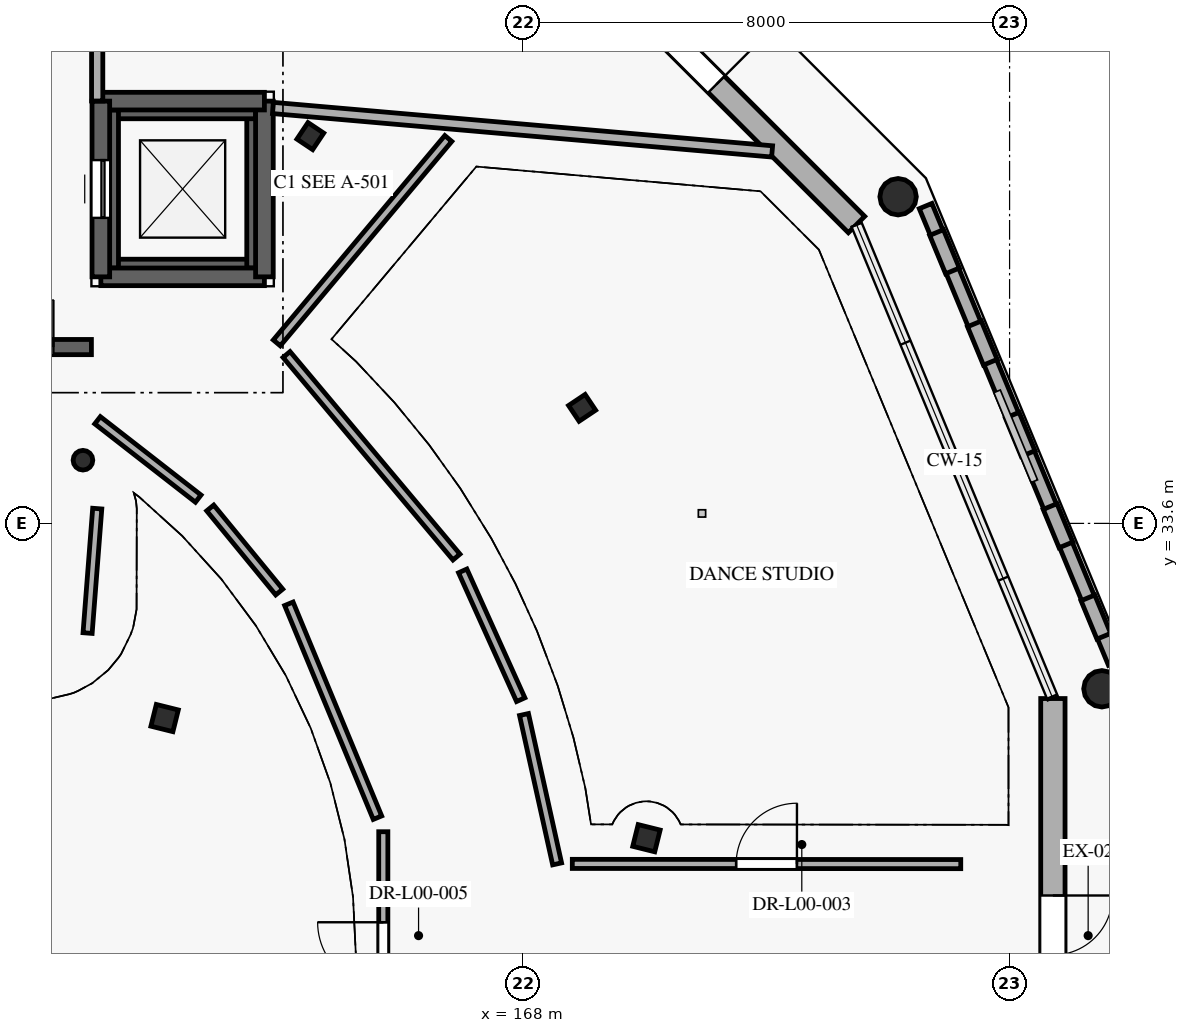
"""IFC4 building model, lengths in metres.
Left out: names, types, materials, properties, quantities, classifications, styles, units other than length and angle.
Written with IfcOpenShell. Run it as: python <this file> out.ifc"""

import sys

from ifc_helpers import new_model, si_unit, direction, frame, frame_2d, origin, origin_2d, place, context, subcontext, project, spatial, rectangle, circle, hollow_circle, i_section, extrude, element, fill, save


model = new_model("IFC4")
c1 = context("Model", 3, precision=1e-05, world=origin(), true_north=direction((0.0, 1.0)))
c2 = subcontext(c1, "Body", "Model", "MODEL_VIEW")
j1 = project(units=[si_unit("LENGTHUNIT", "METRE"), si_unit("PLANEANGLEUNIT", "RADIAN")], contexts=[c1])
p1 = place(None, origin())
s1 = spatial("IfcSite", under=j1, at=p1, CompositionType="ELEMENT")
p2 = place(p1, origin())
s2 = spatial("IfcBuilding", under=s1, at=p2, CompositionType="ELEMENT")
p3 = place(p2, origin())
s3 = spatial("IfcBuildingStorey", under=s2, at=p3, CompositionType="ELEMENT", Elevation=0.0)
for number, where, z_axis, x_axis in (
    (1, (162.104, 30.398, 0.0), (0.0, 0.0, 1.0), (0.97, -0.242, 0.0)),
    (2, (170.028, 28.423, 0.0), (0.0, 0.0, 1.0), (0.97, -0.242, 0.0)),
):
    element("IfcColumn", number, at=place(p3, frame(where, z_axis=z_axis, x_axis=x_axis)), inside=s3, PredefinedType="COLUMN", context=c2, shape_type="SweptSolid", body=[
        extrude(i_section(OverallWidth=0.373, OverallDepth=0.368, WebThickness=0.014, FlangeThickness=0.024, FilletRadius=0.015, at=origin_2d()), origin(), (0.0, 0.0, 1.0), 4.2),
    ])
p4 = place(p3, frame((160.761, 34.639, 0.0), z_axis=(0.0, 0.0, 1.0), x_axis=(0.707106781187, 0.707106781187, 0.0)))
e3 = element("IfcColumn", 3, at=p4, inside=s3, PredefinedType="COLUMN", context=c2, shape_type="SweptSolid", body=[
    extrude(hollow_circle(Radius=0.162, WallThickness=0.016, at=origin_2d()), origin(), (0.0, 0.0, 1.0), 4.2),
])
for number, where, z_axis, x_axis in (
    (4, (177.519, 30.88, 0.0), (0.0, 0.0, 1.0), (-0.195, 0.981, 0.0)),
    (5, (174.167, 38.973, 0.0), (0.0, 0.0, 1.0), (-0.556, 0.831, 0.0)),
):
    element("IfcColumn", number, at=place(p3, frame(where, z_axis=z_axis, x_axis=x_axis)), inside=s3, PredefinedType="COLUMN", context=c2, shape_type="SweptSolid", body=[
        extrude(circle(Radius=0.3, at=origin_2d()), origin(), (0.0, 0.0, 1.0), 4.2),
    ])
for number, where, z_axis, x_axis in (
    (6, (168.97, 35.5, 0.0), (0.0, 0.0, 1.0), (-0.556, 0.831, 0.0)),
    (7, (164.5, 39.97, 0.0), (0.0, 0.0, 1.0), (-0.831, 0.556, 0.0)),
):
    element("IfcColumn", number, at=place(p3, frame(where, z_axis=z_axis, x_axis=x_axis)), inside=s3, PredefinedType="COLUMN", context=c2, shape_type="SweptSolid", body=[
        extrude(i_section(OverallWidth=0.311, OverallDepth=0.327, WebThickness=0.016, FlangeThickness=0.025, FilletRadius=0.015, at=origin_2d()), origin(), (0.0, 0.0, 1.0), 4.2),
    ])
p5 = place(p3, frame((167.516, 44.483, 0.0), z_axis=(0.0, 0.0, 1.0), x_axis=(0.707106781187, -0.707106781187, 0.0)))
e8 = element("IfcWall", 8, at=p5, inside=s3, PredefinedType="SOLIDWALL", context=c2, shape_type="SweptSolid", body=[
    extrude(rectangle(XDim=8.439, YDim=0.38, at=frame_2d((4.219, 0.0))), origin(), (0.0, 0.0, 1.0), 3.94),
])
p6 = place(p5, frame((3.26, 0.0, 0.0)))
e9 = element("IfcOpeningElement", 9, at=p6, cuts=e8, PredefinedType="OPENING", context=c2, shape_type="SweptSolid", body=[
    extrude(rectangle(XDim=1.92, YDim=2.18, at=frame_2d((0.96, 1.09))), frame((0.0, 0.2, 0.0), z_axis=(0.0, -1.0, 0.0), x_axis=(1.0, 0.0, 0.0)), (0.0, 0.0, 1.0), 0.4),
])
p7 = place(p3, frame((176.712, 30.719, 0.0), z_axis=(0.0, 0.0, 1.0), x_axis=(0.0, -1.0, 0.0)))
e10 = element("IfcWall", 10, at=p7, inside=s3, PredefinedType="SOLIDWALL", context=c2, shape_type="SweptSolid", body=[
    extrude(rectangle(XDim=8.438, YDim=0.4, at=frame_2d((4.219, 0.0))), origin(), (0.0, 0.0, 1.0), 3.94),
])
p8 = place(p7, frame((3.239, 0.0, 0.0)))
e11 = element("IfcOpeningElement", 11, at=p8, cuts=e10, PredefinedType="OPENING", context=c2, shape_type="SweptSolid", body=[
    extrude(rectangle(XDim=1.96, YDim=2.2, at=frame_2d((0.98, 1.1))), frame((0.0, 0.21, 0.0), z_axis=(0.0, -1.0, 0.0), x_axis=(1.0, 0.0, 0.0)), (0.0, 0.0, 1.0), 0.42),
])
p9 = place(p3, frame((177.73, 31.308, 0.0), z_axis=(0.0, 0.0, 1.0), x_axis=(-0.382701881142, 0.923871890562, 0.0)))
e12 = element("IfcWall", 12, at=p9, inside=s3, PredefinedType="ELEMENTEDWALL", context=c2, shape_type="SweptSolid", body=[
    extrude(rectangle(XDim=8.13, YDim=0.225, at=frame_2d((4.065, 0.0))), origin(), (0.0, 0.0, 1.0), 0.55),
])
for number, where, z_axis, x_axis in (
    (13, (177.55, 31.744, 0.55), (0.0, 0.0, 1.0), (-0.383, 0.924, 0.0)),
    (14, (176.927, 33.246, 0.55), (0.0, 0.0, 1.0), (-0.382, 0.924, 0.0)),
    (15, (176.305, 34.748, 0.55), (0.0, 0.0, 1.0), (-0.383, 0.924, 0.0)),
    (16, (175.683, 36.25, 0.55), (0.0, 0.0, 1.0), (-0.383, 0.924, 0.0)),
    (17, (175.061, 37.753, 0.55), (0.0, 0.0, 1.0), (-0.383, 0.924, 0.0)),
):
    element("IfcWall", number, at=place(p3, frame(where, z_axis=z_axis, x_axis=x_axis)), inside=s3, PredefinedType="ELEMENTEDWALL", context=c2, shape_type="SweptSolid", body=[
        extrude(rectangle(XDim=0.683, YDim=0.245, at=frame_2d((0.342, 0.0))), origin(), (0.0, 0.0, 1.0), 3.39),
    ])
p10 = place(p3, frame((161.2, 37.8, -1.4), z_axis=(0.0, 0.0, 1.0), x_axis=(1.0, 0.0, 0.0)))
e18 = element("IfcWall", 18, at=p10, inside=s3, PredefinedType="SHEAR", context=c2, shape_type="SweptSolid", body=[
    extrude(rectangle(XDim=2.4, YDim=0.29, at=frame_2d((1.2, 0.0))), origin(), (0.0, 0.0, 1.0), 1.4),
])
p11 = place(p3, frame((163.6, 37.8, -1.4), z_axis=(0.0, 0.0, 1.0), x_axis=(0.0, 1.0, 0.0)))
e19 = element("IfcWall", 19, at=p11, inside=s3, PredefinedType="SHEAR", context=c2, shape_type="SweptSolid", body=[
    extrude(rectangle(XDim=2.6, YDim=0.29, at=frame_2d((1.3, 0.0))), origin(), (0.0, 0.0, 1.0), 1.4),
])
p12 = place(p3, frame((163.6, 40.4, -1.4), z_axis=(0.0, 0.0, 1.0), x_axis=(-1.0, 0.0, 0.0)))
e20 = element("IfcWall", 20, at=p12, inside=s3, PredefinedType="SHEAR", context=c2, shape_type="SweptSolid", body=[
    extrude(rectangle(XDim=2.4, YDim=0.29, at=frame_2d((1.2, 0.0))), origin(), (0.0, 0.0, 1.0), 1.4),
])
p13 = place(p3, frame((161.2, 40.4, -1.4), z_axis=(0.0, 0.0, 1.0), x_axis=(0.0, -1.0, 0.0)))
e21 = element("IfcWall", 21, at=p13, inside=s3, PredefinedType="SHEAR", context=c2, shape_type="SweptSolid", body=[
    extrude(rectangle(XDim=2.6, YDim=0.29, at=frame_2d((1.3, 0.0))), origin(), (0.0, 0.0, 1.0), 1.4),
])
p14 = place(p3, frame((161.055, 37.655, 0.0), z_axis=(0.0, 0.0, 1.0), x_axis=(1.0, 0.0, 0.0)))
e22 = element("IfcWall", 22, at=p14, inside=s3, PredefinedType="SHEAR", context=c2, shape_type="SweptSolid", body=[
    extrude(rectangle(XDim=2.69, YDim=0.29, at=frame_2d((1.345, 0.0))), origin(), (0.0, 0.0, 1.0), 3.95),
])
p15 = place(p3, frame((163.745, 37.655, 0.0), z_axis=(0.0, 0.0, 1.0), x_axis=(0.0, 1.0, 0.0)))
e23 = element("IfcWall", 23, at=p15, inside=s3, PredefinedType="SHEAR", context=c2, shape_type="SweptSolid", body=[
    extrude(rectangle(XDim=2.89, YDim=0.29, at=frame_2d((1.445, 0.0))), origin(), (0.0, 0.0, 1.0), 3.95),
])
p16 = place(p3, frame((163.745, 40.545, 0.0), z_axis=(0.0, 0.0, 1.0), x_axis=(-1.0, 0.0, 0.0)))
e24 = element("IfcWall", 24, at=p16, inside=s3, PredefinedType="SHEAR", context=c2, shape_type="SweptSolid", body=[
    extrude(rectangle(XDim=2.69, YDim=0.29, at=frame_2d((1.345, 0.0))), origin(), (0.0, 0.0, 1.0), 3.95),
])
p17 = place(p3, frame((161.055, 40.545, 0.0), z_axis=(0.0, 0.0, 1.0), x_axis=(0.0, -1.0, 0.0)))
e25 = element("IfcWall", 25, at=p17, inside=s3, PredefinedType="SHEAR", context=c2, shape_type="SweptSolid", body=[
    extrude(rectangle(XDim=2.89, YDim=0.29, at=frame_2d((1.445, 0.0))), origin(), (0.0, 0.0, 1.0), 3.95),
])
p18 = place(p17, frame((0.97, 0.0, 0.0)))
e26 = element("IfcOpeningElement", 26, at=p18, cuts=e25, PredefinedType="OPENING", context=c2, shape_type="SweptSolid", body=[
    extrude(rectangle(XDim=0.95, YDim=2.1, at=frame_2d((0.475, 1.05))), frame((0.0, 0.155, 0.0), z_axis=(0.0, -1.0, 0.0), x_axis=(1.0, 0.0, 0.0)), (0.0, 0.0, 1.0), 0.31),
])
p19 = place(p3, frame((158.1, 36.5, 0.0), z_axis=(0.0, 0.0, 1.0), x_axis=(1.0, 0.0, 0.0)))
e27 = element("IfcWall", 27, at=p19, inside=s3, PredefinedType="SHEAR", context=c2, shape_type="SweptSolid", body=[
    extrude(rectangle(XDim=2.8, YDim=0.25, at=frame_2d((1.4, 0.0))), origin(), (0.0, 0.0, 1.0), 3.95),
])
p20 = place(p19, frame((0.625, 0.0, 0.0)))
e28 = element("IfcOpeningElement", 28, at=p20, cuts=e27, PredefinedType="OPENING", context=c2, shape_type="SweptSolid", body=[
    extrude(rectangle(XDim=1.55, YDim=2.15, at=frame_2d((0.775, 1.075))), frame((0.0, 0.135, 0.0), z_axis=(0.0, -1.0, 0.0), x_axis=(1.0, 0.0, 0.0)), (0.0, 0.0, 1.0), 0.27),
])
p21 = place(p3, frame((160.995, 41.995, 0.0), z_axis=(0.0, 0.0, 1.0), x_axis=(0.0, -1.0, 0.0)))
e29 = element("IfcWall", 29, at=p21, inside=s3, PredefinedType="PARTITIONING", context=c2, shape_type="SweptSolid", body=[
    extrude(rectangle(XDim=1.448, YDim=0.185, at=frame_2d((0.724, 0.0))), origin(), (0.0, 0.0, 1.0), 3.667),
])
p22 = place(p3, frame((163.886, 40.433, 0.0), z_axis=(0.0, 0.0, 1.0), x_axis=(0.996232022213, -0.086728068795, 0.0)))
e30 = element("IfcWall", 30, at=p22, inside=s3, PredefinedType="PARTITIONING", context=c2, shape_type="SweptSolid", body=[
    extrude(rectangle(XDim=8.24, YDim=0.185, at=frame_2d((4.12, 0.0))), origin(), (0.0, 0.0, 1.0), 3.915),
])
p23 = place(p3, frame((166.77, 39.93, 0.0), z_axis=(0.0, 0.0, 1.0), x_axis=(-0.642801882446, -0.766032466626, 0.0)))
e31 = element("IfcWall", 31, at=p23, inside=s3, PredefinedType="PARTITIONING", context=c2, shape_type="SweptSolid", body=[
    extrude(rectangle(XDim=4.388, YDim=0.15, at=frame_2d((2.194, 0.0))), origin(), (0.0, 0.0, 1.0), 3.915),
])
p24 = place(p3, frame((164.109, 36.377, 0.0), z_axis=(0.0, 0.0, 1.0), x_axis=(0.642699450702, -0.766118408647, 0.0)))
e32 = element("IfcWall", 32, at=p24, inside=s3, PredefinedType="PARTITIONING", context=c2, shape_type="SweptSolid", body=[
    extrude(rectangle(XDim=4.348, YDim=0.15, at=frame_2d((2.174, 0.0))), origin(), (0.0, 0.0, 1.0), 3.915),
])
p25 = place(p3, frame((167.006, 32.819, 0.0), z_axis=(0.0, 0.0, 1.0), x_axis=(0.410736103382, -0.911754272476, 0.0)))
e33 = element("IfcWall", 33, at=p25, inside=s3, PredefinedType="PARTITIONING", context=c2, shape_type="SweptSolid", body=[
    extrude(rectangle(XDim=2.323, YDim=0.15, at=frame_2d((1.162, 0.0))), origin(), (0.0, 0.0, 1.0), 3.915),
])
p26 = place(p3, frame((168.014, 30.457, 0.0), z_axis=(0.0, 0.0, 1.0), x_axis=(0.216468126475, -0.976289685606, 0.0)))
e34 = element("IfcWall", 34, at=p26, inside=s3, PredefinedType="PARTITIONING", context=c2, shape_type="SweptSolid", body=[
    extrude(rectangle(XDim=2.516, YDim=0.15, at=frame_2d((1.258, 0.0))), origin(), (0.0, 0.0, 1.0), 3.915),
])
p27 = place(p3, frame((168.809, 28.0, 0.0), z_axis=(0.0, 0.0, 1.0), x_axis=(0.99999981306, -0.000611457065, 0.0)))
e35 = element("IfcWall", 35, at=p27, inside=s3, PredefinedType="PARTITIONING", context=c2, shape_type="SweptSolid", body=[
    extrude(rectangle(XDim=6.388, YDim=0.15, at=frame_2d((3.194, 0.0))), origin(), (0.0, 0.0, 1.0), 3.915),
])
p28 = place(p27, frame((2.694, 0.0, 0.0)))
e36 = element("IfcOpeningElement", 36, at=p28, cuts=e35, PredefinedType="OPENING", context=c2, shape_type="SweptSolid", body=[
    extrude(rectangle(XDim=1.0, YDim=2.1, at=frame_2d((0.5, 1.05))), frame((0.0, 0.085, 0.0), z_axis=(0.0, -1.0, 0.0), x_axis=(1.0, 0.0, 0.0)), (0.0, 0.0, 1.0), 0.17),
])
p29 = place(p3, frame((165.7, 24.471, 0.0), z_axis=(0.0, 0.0, 1.0), x_axis=(0.0, 1.0, 0.0)))
e37 = element("IfcWall", 37, at=p29, inside=s3, PredefinedType="PARTITIONING", context=c2, shape_type="SweptSolid", body=[
    extrude(rectangle(XDim=4.058, YDim=0.15, at=frame_2d((2.029, 0.0))), origin(), (0.0, 0.0, 1.0), 3.915),
])
p30 = place(p29, frame((1.489, 0.0, 0.0)))
e38 = element("IfcOpeningElement", 38, at=p30, cuts=e37, PredefinedType="OPENING", context=c2, shape_type="SweptSolid", body=[
    extrude(rectangle(XDim=1.08, YDim=2.12, at=frame_2d((0.54, 1.06))), frame((0.0, 0.085, 0.0), z_axis=(0.0, -1.0, 0.0), x_axis=(1.0, 0.0, 0.0)), (0.0, 0.0, 1.0), 0.17),
])
p31 = place(p3, frame((165.604, 28.76, 0.0), z_axis=(0.0, 0.0, 1.0), x_axis=(-0.382716092408, 0.923866003602, 0.0)))
e39 = element("IfcWall", 39, at=p31, inside=s3, PredefinedType="PARTITIONING", context=c2, shape_type="SweptSolid", body=[
    extrude(rectangle(XDim=3.808, YDim=0.15, at=frame_2d((1.904, 0.0))), origin(), (0.0, 0.0, 1.0), 3.915),
])
p32 = place(p3, frame((163.989, 32.471, 0.0), z_axis=(0.0, 0.0, 1.0), x_axis=(-0.634366805564, 0.773032183029, 0.0)))
e40 = element("IfcWall", 40, at=p32, inside=s3, PredefinedType="PARTITIONING", context=c2, shape_type="SweptSolid", body=[
    extrude(rectangle(XDim=1.789, YDim=0.15, at=frame_2d((0.895, 0.0))), origin(), (0.0, 0.0, 1.0), 3.915),
])
p33 = place(p3, frame((162.657, 34.007, 0.0), z_axis=(0.0, 0.0, 1.0), x_axis=(-0.789020035583, 0.614367466138, 0.0)))
e41 = element("IfcWall", 41, at=p33, inside=s3, PredefinedType="PARTITIONING", context=c2, shape_type="SweptSolid", body=[
    extrude(rectangle(XDim=2.098, YDim=0.15, at=frame_2d((1.049, 0.0))), origin(), (0.0, 0.0, 1.0), 3.915),
])
p34 = place(p3, frame((160.996, 33.843, 0.0), z_axis=(0.0, 0.0, 1.0), x_axis=(-0.077287507527, -0.997008847092, 0.0)))
e42 = element("IfcWall", 42, at=p34, inside=s3, PredefinedType="PARTITIONING", context=c2, shape_type="SweptSolid", body=[
    extrude(rectangle(XDim=2.053, YDim=0.15, at=frame_2d((1.027, 0.0))), origin(), (0.0, 0.0, 1.0), 3.915),
])
p35 = place(p8, origin())
e43 = element("IfcDoor", 43, at=p35, inside=s3, OperationType="DOUBLE_DOOR_SINGLE_SWING", PredefinedType="DOOR", context=c2, shape_type="SweptSolid", body=[
    extrude(rectangle(XDim=1.96, YDim=2.2, at=frame_2d((0.98, 1.1))), frame((0.0, 0.025, 0.0), z_axis=(0.0, -1.0, 0.0), x_axis=(1.0, 0.0, 0.0)), (0.0, 0.0, 1.0), 0.05),
])
fill(e11, e43)
p36 = place(p6, origin())
e44 = element("IfcDoor", 44, at=p36, inside=s3, OperationType="DOUBLE_DOOR_SINGLE_SWING", PredefinedType="DOOR", context=c2, shape_type="SweptSolid", body=[
    extrude(rectangle(XDim=1.92, YDim=2.18, at=frame_2d((0.96, 1.09))), frame((0.0, 0.025, 0.0), z_axis=(0.0, -1.0, 0.0), x_axis=(1.0, 0.0, 0.0)), (0.0, 0.0, 1.0), 0.05),
])
fill(e9, e44)
p37 = place(p18, frame((0.95, 0.0, 0.0), z_axis=(0.0, 0.0, 1.0), x_axis=(-1.0, 0.0, 0.0)))
e45 = element("IfcDoor", 45, at=p37, inside=s3, OperationType="SLIDING_TO_LEFT", PredefinedType="DOOR", context=c2, shape_type="SweptSolid", body=[
    extrude(rectangle(XDim=0.95, YDim=2.1, at=frame_2d((0.475, 1.05))), frame((0.0, 0.025, 0.0), z_axis=(0.0, -1.0, 0.0), x_axis=(1.0, 0.0, 0.0)), (0.0, 0.0, 1.0), 0.05),
])
fill(e26, e45)
p38 = place(p20, frame((1.55, 0.0, 0.0), z_axis=(0.0, 0.0, 1.0), x_axis=(-1.0, 0.0, 0.0)))
e46 = element("IfcDoor", 46, at=p38, inside=s3, OperationType="DOUBLE_DOOR_SINGLE_SWING", PredefinedType="DOOR", context=c2, shape_type="SweptSolid", body=[
    extrude(rectangle(XDim=1.55, YDim=2.15, at=frame_2d((0.775, 1.075))), frame((0.0, 0.025, 0.0), z_axis=(0.0, -1.0, 0.0), x_axis=(1.0, 0.0, 0.0)), (0.0, 0.0, 1.0), 0.05),
])
fill(e28, e46)
p39 = place(p28, origin())
e47 = element("IfcDoor", 47, at=p39, inside=s3, OperationType="SINGLE_SWING_RIGHT", PredefinedType="DOOR", context=c2, shape_type="SweptSolid", body=[
    extrude(rectangle(XDim=1.0, YDim=2.1, at=frame_2d((0.5, 1.05))), frame((0.0, 0.025, 0.0), z_axis=(0.0, -1.0, 0.0), x_axis=(1.0, 0.0, 0.0)), (0.0, 0.0, 1.0), 0.05),
])
fill(e36, e47)
p40 = place(p30, origin())
e48 = element("IfcDoor", 48, at=p40, inside=s3, OperationType="SINGLE_SWING_RIGHT", PredefinedType="DOOR", context=c2, shape_type="SweptSolid", body=[
    extrude(rectangle(XDim=1.08, YDim=2.12, at=frame_2d((0.54, 1.06))), frame((0.0, 0.025, 0.0), z_axis=(0.0, -1.0, 0.0), x_axis=(1.0, 0.0, 0.0)), (0.0, 0.0, 1.0), 0.05),
])
fill(e38, e48)
save(model, sys.argv[1])
